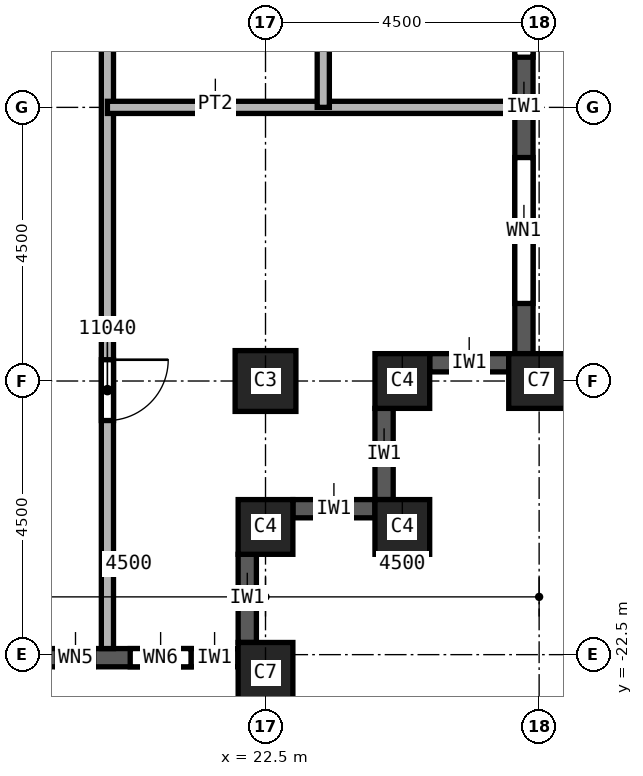
"""IFC4 building model, lengths in metres.
Left out: names, types, materials, properties, quantities, classifications, styles, units other than length and angle.
Written with IfcOpenShell. Run it as: python <this file> out.ifc"""

import sys

from ifc_helpers import new_model, si_unit, direction, frame, frame_2d, origin, origin_2d, place, context, subcontext, project, spatial, rectangle, extrude, element, fill, save


model = new_model("IFC4")
c1 = context("Model", 3, precision=1e-05, world=origin(), true_north=direction((0.0, 1.0)))
c2 = subcontext(c1, "Body", "Model", "MODEL_VIEW")
j1 = project(units=[si_unit("LENGTHUNIT", "METRE"), si_unit("PLANEANGLEUNIT", "RADIAN")], contexts=[c1])
p1 = place(None, origin())
s1 = spatial("IfcSite", under=j1, at=p1, CompositionType="ELEMENT")
p2 = place(p1, origin())
s2 = spatial("IfcBuilding", under=s1, at=p2, CompositionType="ELEMENT")
p3 = place(p2, frame((0.0, 0.0, 188.0)))
s3 = spatial("IfcBuildingStorey", under=s2, at=p3, CompositionType="ELEMENT", Elevation=188.0)
p4 = place(p3, frame((22.5, -18.0, 0.0), z_axis=(0.0, 0.0, 1.0), x_axis=(1.0, 0.0, 0.0)))
e1 = element("IfcColumn", 1, at=p4, inside=s3, PredefinedType="COLUMN", context=c2, shape_type="SweptSolid", body=[
    extrude(rectangle(XDim=1.0, YDim=1.0, at=origin_2d()), origin(), (0.0, 0.0, 1.0), 3.72),
])
for number, where, z_axis, x_axis in (
    (2, (27.0, -18.0, 0.0), (0.0, 0.0, 1.0), (0.0, 1.0, 0.0)),
    (3, (22.5, -22.8, 0.0), (0.0, 0.0, 1.0), (1.0, 0.0, 0.0)),
):
    element("IfcColumn", number, at=place(p3, frame(where, z_axis=z_axis, x_axis=x_axis)), inside=s3, PredefinedType="COLUMN", context=c2, shape_type="SweptSolid", body=[
        extrude(rectangle(XDim=0.9, YDim=1.0, at=origin_2d()), origin(), (0.0, 0.0, 1.0), 3.72),
    ])
for number, where, z_axis, x_axis in (
    (4, (22.5, -20.4, 0.0), (0.0, 0.0, 1.0), (1.0, 0.0, 0.0)),
    (5, (24.75, -20.4, 0.0), (0.0, 0.0, 1.0), (1.0, 0.0, 0.0)),
    (6, (24.75, -18.0, 0.0), (0.0, 0.0, 1.0), (1.0, 0.0, 0.0)),
):
    element("IfcColumn", number, at=place(p3, frame(where, z_axis=z_axis, x_axis=x_axis)), inside=s3, PredefinedType="COLUMN", context=c2, shape_type="SweptSolid", body=[
        extrude(rectangle(XDim=0.9, YDim=0.9, at=origin_2d()), origin(), (0.0, 0.0, 1.0), 3.72),
    ])
p5 = place(p3, frame((18.45, -22.55, 0.0), z_axis=(0.0, 0.0, 1.0), x_axis=(1.0, 0.0, 0.0)))
e7 = element("IfcWall", 7, at=p5, inside=s3, PredefinedType="SOLIDWALL", context=c2, shape_type="SweptSolid", body=[
    extrude(rectangle(XDim=3.6, YDim=0.3, at=frame_2d((1.8, 0.0))), origin(), (0.0, 0.0, 1.0), 3.12),
])
p6 = place(p5, frame((0.625, 0.0, 0.8)))
e8 = element("IfcOpeningElement", 8, at=p6, cuts=e7, PredefinedType="OPENING", context=c2, shape_type="SweptSolid", body=[
    extrude(rectangle(XDim=0.6, YDim=1.95, at=frame_2d((0.3, 0.975))), frame((0.0, 0.15, 0.0), z_axis=(0.0, -1.0, 0.0), x_axis=(1.0, 0.0, 0.0)), (0.0, 0.0, 1.0), 0.3),
])
p7 = place(p5, frame((1.825, 0.0, 0.8)))
e9 = element("IfcOpeningElement", 9, at=p7, cuts=e7, PredefinedType="OPENING", context=c2, shape_type="SweptSolid", body=[
    extrude(rectangle(XDim=1.0, YDim=1.95, at=frame_2d((0.5, 0.975))), frame((0.0, 0.15, 0.0), z_axis=(0.0, -1.0, 0.0), x_axis=(1.0, 0.0, 0.0)), (0.0, 0.0, 1.0), 0.3),
])
p8 = place(p3, frame((22.2, -22.3, 0.0), z_axis=(0.0, 0.0, 1.0), x_axis=(0.0, 1.0, 0.0)))
e10 = element("IfcWall", 10, at=p8, inside=s3, PredefinedType="SOLIDWALL", context=c2, shape_type="SweptSolid", body=[
    extrude(rectangle(XDim=1.45, YDim=0.3, at=frame_2d((0.725, 0.0))), origin(), (0.0, 0.0, 1.0), 3.12),
])
p9 = place(p3, frame((22.95, -20.1, 0.0), z_axis=(0.0, 0.0, 1.0), x_axis=(1.0, 0.0, 0.0)))
e11 = element("IfcWall", 11, at=p9, inside=s3, PredefinedType="SOLIDWALL", context=c2, shape_type="SweptSolid", body=[
    extrude(rectangle(XDim=1.35, YDim=0.3, at=frame_2d((0.675, 0.0))), origin(), (0.0, 0.0, 1.0), 3.12),
])
p10 = place(p3, frame((24.45, -19.95, 0.0), z_axis=(0.0, 0.0, 1.0), x_axis=(0.0, 1.0, 0.0)))
e12 = element("IfcWall", 12, at=p10, inside=s3, PredefinedType="SOLIDWALL", context=c2, shape_type="SweptSolid", body=[
    extrude(rectangle(XDim=1.5, YDim=0.3, at=frame_2d((0.75, 0.0))), origin(), (0.0, 0.0, 1.0), 3.12),
])
p11 = place(p3, frame((25.2, -17.7, 0.0), z_axis=(0.0, 0.0, 1.0), x_axis=(1.0, 0.0, 0.0)))
e13 = element("IfcWall", 13, at=p11, inside=s3, PredefinedType="SOLIDWALL", context=c2, shape_type="SweptSolid", body=[
    extrude(rectangle(XDim=1.3, YDim=0.3, at=frame_2d((0.65, 0.0))), origin(), (0.0, 0.0, 1.0), 3.12),
])
p12 = place(p3, frame((26.75, -17.55, 0.0), z_axis=(0.0, 0.0, 1.0), x_axis=(0.0, 1.0, 0.0)))
e14 = element("IfcWall", 14, at=p12, inside=s3, PredefinedType="SOLIDWALL", context=c2, shape_type="SweptSolid", body=[
    extrude(rectangle(XDim=8.1, YDim=0.3, at=frame_2d((4.05, 0.0))), origin(), (0.0, 0.0, 1.0), 3.12),
])
p13 = place(p12, frame((0.825, 0.0, 0.8)))
e15 = element("IfcOpeningElement", 15, at=p13, cuts=e14, PredefinedType="OPENING", context=c2, shape_type="SweptSolid", body=[
    extrude(rectangle(XDim=2.4, YDim=1.95, at=frame_2d((1.2, 0.975))), frame((0.0, 0.15, 0.0), z_axis=(0.0, -1.0, 0.0), x_axis=(1.0, 0.0, 0.0)), (0.0, 0.0, 1.0), 0.3),
])
p14 = place(p12, frame((4.875, 0.0, 0.8)))
e16 = element("IfcOpeningElement", 16, at=p14, cuts=e14, PredefinedType="OPENING", context=c2, shape_type="SweptSolid", body=[
    extrude(rectangle(XDim=2.4, YDim=1.95, at=frame_2d((1.2, 0.975))), frame((0.0, 0.15, 0.0), z_axis=(0.0, -1.0, 0.0), x_axis=(1.0, 0.0, 0.0)), (0.0, 0.0, 1.0), 0.3),
])
p15 = place(p3, frame((19.9, 22.4, 0.0), z_axis=(0.0, 0.0, 1.0), x_axis=(0.0, -1.0, 0.0)))
e17 = element("IfcWall", 17, at=p15, inside=s3, PredefinedType="PARTITIONING", context=c2, shape_type="SweptSolid", body=[
    extrude(rectangle(XDim=44.8, YDim=0.2, at=frame_2d((22.4, 0.0))), origin(), (0.0, 0.0, 1.0), 3.72),
])
p16 = place(p15, frame((20.3, 0.0, 0.0)))
e18 = element("IfcOpeningElement", 18, at=p16, cuts=e17, PredefinedType="OPENING", context=c2, shape_type="SweptSolid", body=[
    extrude(rectangle(XDim=1.0, YDim=2.1, at=frame_2d((0.5, 1.05))), frame((0.0, 0.1, 0.0), z_axis=(0.0, -1.0, 0.0), x_axis=(1.0, 0.0, 0.0)), (0.0, 0.0, 1.0), 0.2),
])
p17 = place(p15, frame((13.85, 0.0, 0.0)))
e19 = element("IfcOpeningElement", 19, at=p17, cuts=e17, PredefinedType="OPENING", context=c2, shape_type="SweptSolid", body=[
    extrude(rectangle(XDim=1.0, YDim=2.1, at=frame_2d((0.5, 1.05))), frame((0.0, 0.1, 0.0), z_axis=(0.0, -1.0, 0.0), x_axis=(1.0, 0.0, 0.0)), (0.0, 0.0, 1.0), 0.2),
])
p18 = place(p15, frame((5.2, 0.0, 0.0)))
e20 = element("IfcOpeningElement", 20, at=p18, cuts=e17, PredefinedType="OPENING", context=c2, shape_type="SweptSolid", body=[
    extrude(rectangle(XDim=1.0, YDim=2.1, at=frame_2d((0.5, 1.05))), frame((0.0, 0.1, 0.0), z_axis=(0.0, -1.0, 0.0), x_axis=(1.0, 0.0, 0.0)), (0.0, 0.0, 1.0), 0.2),
])
p19 = place(p15, frame((40.05, 0.0, 0.0)))
e21 = element("IfcOpeningElement", 21, at=p19, cuts=e17, PredefinedType="OPENING", context=c2, shape_type="SweptSolid", body=[
    extrude(rectangle(XDim=1.0, YDim=2.1, at=frame_2d((0.5, 1.05))), frame((0.0, 0.1, 0.0), z_axis=(0.0, -1.0, 0.0), x_axis=(1.0, 0.0, 0.0)), (0.0, 0.0, 1.0), 0.2),
])
p20 = place(p15, frame((26.9, 0.0, 0.0)))
e22 = element("IfcOpeningElement", 22, at=p20, cuts=e17, PredefinedType="OPENING", context=c2, shape_type="SweptSolid", body=[
    extrude(rectangle(XDim=1.0, YDim=2.1, at=frame_2d((0.5, 1.05))), frame((0.0, 0.1, 0.0), z_axis=(0.0, -1.0, 0.0), x_axis=(1.0, 0.0, 0.0)), (0.0, 0.0, 1.0), 0.2),
])
p21 = place(p3, frame((19.9, -13.5, 0.0), z_axis=(0.0, 0.0, 1.0), x_axis=(1.0, 0.0, 0.0)))
e23 = element("IfcWall", 23, at=p21, inside=s3, PredefinedType="PARTITIONING", context=c2, shape_type="SweptSolid", body=[
    extrude(rectangle(XDim=6.7, YDim=0.2, at=frame_2d((3.35, 0.0))), origin(), (0.0, 0.0, 1.0), 3.72),
])
p22 = place(p3, frame((23.45, 0.0, 0.0), z_axis=(0.0, 0.0, 1.0), x_axis=(0.0, -1.0, 0.0)))
e24 = element("IfcWall", 24, at=p22, inside=s3, PredefinedType="PARTITIONING", context=c2, shape_type="SweptSolid", body=[
    extrude(rectangle(XDim=13.5, YDim=0.2, at=frame_2d((6.75, 0.0))), origin(), (0.0, 0.0, 1.0), 3.72),
])
p23 = place(p22, frame((3.55, 0.0, 0.0)))
e25 = element("IfcOpeningElement", 25, at=p23, cuts=e24, PredefinedType="OPENING", context=c2, shape_type="SweptSolid", body=[
    extrude(rectangle(XDim=1.0, YDim=2.1, at=frame_2d((0.5, 1.05))), frame((0.0, 0.1, 0.0), z_axis=(0.0, -1.0, 0.0), x_axis=(1.0, 0.0, 0.0)), (0.0, 0.0, 1.0), 0.2),
])
p24 = place(p13, origin())
e26 = element("IfcWindow", 26, at=p24, inside=s3, PartitioningType="SINGLE_PANEL", PredefinedType="WINDOW", context=c2, shape_type="SweptSolid", body=[
    extrude(rectangle(XDim=2.4, YDim=1.95, at=frame_2d((1.2, 0.975))), frame((0.0, 0.03, 0.0), z_axis=(0.0, -1.0, 0.0), x_axis=(1.0, 0.0, 0.0)), (0.0, 0.0, 1.0), 0.06),
])
fill(e15, e26)
p25 = place(p14, origin())
e27 = element("IfcWindow", 27, at=p25, inside=s3, PartitioningType="SINGLE_PANEL", PredefinedType="WINDOW", context=c2, shape_type="SweptSolid", body=[
    extrude(rectangle(XDim=2.4, YDim=1.95, at=frame_2d((1.2, 0.975))), frame((0.0, 0.03, 0.0), z_axis=(0.0, -1.0, 0.0), x_axis=(1.0, 0.0, 0.0)), (0.0, 0.0, 1.0), 0.06),
])
fill(e16, e27)
p26 = place(p19, origin())
e28 = element("IfcDoor", 28, at=p26, inside=s3, OperationType="SINGLE_SWING_LEFT", PredefinedType="DOOR", context=c2, shape_type="SweptSolid", body=[
    extrude(rectangle(XDim=1.0, YDim=2.1, at=frame_2d((0.5, 1.05))), frame((0.0, 0.025, 0.0), z_axis=(0.0, -1.0, 0.0), x_axis=(1.0, 0.0, 0.0)), (0.0, 0.0, 1.0), 0.05),
])
fill(e21, e28)
p27 = place(p6, origin())
e29 = element("IfcWindow", 29, at=p27, inside=s3, PartitioningType="SINGLE_PANEL", PredefinedType="WINDOW", context=c2, shape_type="SweptSolid", body=[
    extrude(rectangle(XDim=0.6, YDim=1.95, at=frame_2d((0.3, 0.975))), frame((0.0, 0.03, 0.0), z_axis=(0.0, -1.0, 0.0), x_axis=(1.0, 0.0, 0.0)), (0.0, 0.0, 1.0), 0.06),
])
fill(e8, e29)
p28 = place(p7, origin())
e30 = element("IfcWindow", 30, at=p28, inside=s3, PartitioningType="SINGLE_PANEL", PredefinedType="WINDOW", context=c2, shape_type="SweptSolid", body=[
    extrude(rectangle(XDim=1.0, YDim=1.95, at=frame_2d((0.5, 0.975))), frame((0.0, 0.03, 0.0), z_axis=(0.0, -1.0, 0.0), x_axis=(1.0, 0.0, 0.0)), (0.0, 0.0, 1.0), 0.06),
])
fill(e9, e30)
save(model, sys.argv[1])
